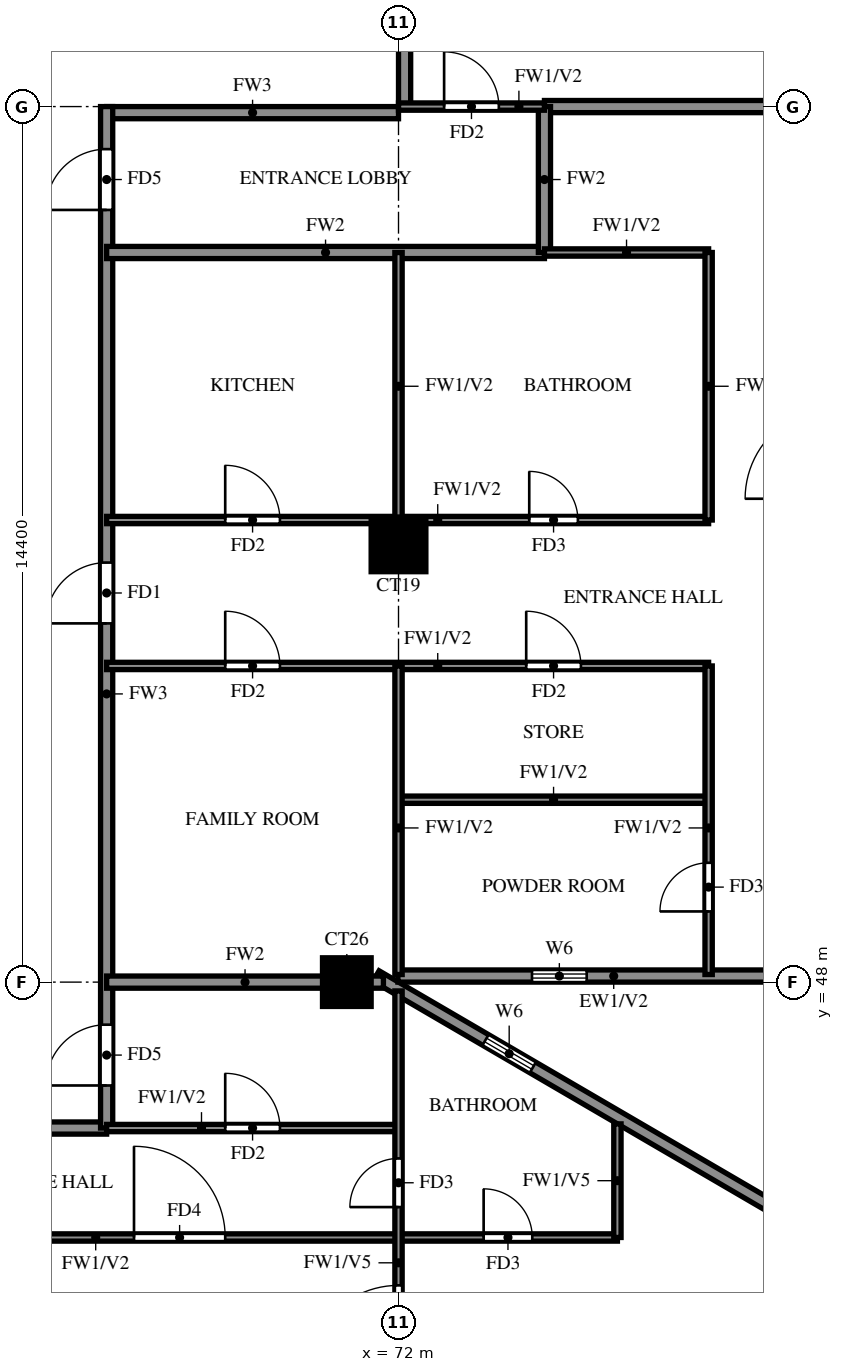
"""IFC4 building model, lengths in metres.
Left out: names, types, materials, properties, quantities, classifications, styles, units other than length and angle.
Written with IfcOpenShell. Run it as: python <this file> out.ifc"""

import sys

from ifc_helpers import new_model, si_unit, direction, frame, frame_2d, origin, origin_2d, place, context, subcontext, project, spatial, rectangle, extrude, source, transform, mapped, element, fill, save


model = new_model("IFC4")
c1 = context("Model", 3, precision=1e-05, world=origin(), true_north=direction((0.0, 1.0)))
c2 = subcontext(c1, "Body", "Model", "MODEL_VIEW")
j1 = project(units=[si_unit("LENGTHUNIT", "METRE"), si_unit("PLANEANGLEUNIT", "RADIAN")], contexts=[c1])
p1 = place(None, origin())
s1 = spatial("IfcSite", under=j1, at=p1, CompositionType="ELEMENT")
p2 = place(p1, origin())
s2 = spatial("IfcBuilding", under=s1, at=p2, CompositionType="ELEMENT")
p3 = place(p2, frame((0.0, 0.0, 192.0)))
s3 = spatial("IfcBuildingStorey", under=s2, at=p3, CompositionType="ELEMENT", Elevation=192.0)
m1 = source(origin(), c2, "Body", "SweptSolid", [
    extrude(rectangle(XDim=0.8, YDim=0.8, at=origin_2d()), origin(), (0.0, 0.0, 1.0), 3.2),
])
p4 = place(p3, frame((71.15, 48.0, 0.0), z_axis=(0.0, 0.0, 1.0), x_axis=(1.0, 0.0, 0.0)))
e1 = element("IfcColumn", 1, at=p4, inside=s3, PredefinedType="COLUMN", context=c2, shape_type="MappedRepresentation", body=[
    mapped(m1, transform((0.0, 0.0, 0.0))),
])
m2 = source(origin(), c2, "Body", "SweptSolid", [
    extrude(rectangle(XDim=0.9, YDim=0.9, at=origin_2d()), origin(), (0.0, 0.0, 1.0), 3.2),
])
p5 = place(p3, frame((72.0, 55.2, 0.0), z_axis=(0.0, 0.0, 1.0), x_axis=(1.0, 0.0, 0.0)))
e2 = element("IfcColumn", 2, at=p5, inside=s3, PredefinedType="COLUMN", context=c2, shape_type="MappedRepresentation", body=[
    mapped(m2, transform((0.0, 0.0, 0.0))),
])
p6 = place(p3, frame((85.719, 39.881, 0.0), z_axis=(0.0, 0.0, 1.0), x_axis=(-0.86377618652, 0.503875678716, 0.0)))
e3 = element("IfcWall", 3, at=p6, inside=s3, PredefinedType="SOLIDWALL", context=c2, shape_type="SweptSolid", body=[
    extrude(rectangle(XDim=16.311, YDim=0.2, at=frame_2d((8.156, 0.0))), origin(), (0.0, 0.0, 1.0), 3.2),
])
p7 = place(p6, frame((13.326, 0.0, 1.5)))
e4 = element("IfcOpeningElement", 4, at=p7, cuts=e3, PredefinedType="OPENING", context=c2, shape_type="SweptSolid", body=[
    extrude(rectangle(XDim=0.9, YDim=0.9, at=frame_2d((0.45, 0.45))), frame((0.0, 0.11, 0.0), z_axis=(0.0, -1.0, 0.0), x_axis=(1.0, 0.0, 0.0)), (0.0, 0.0, 1.0), 0.22),
])
p8 = place(p3, frame((71.99, 48.1, 0.0), z_axis=(0.0, 0.0, 1.0), x_axis=(1.0, 0.0, 0.0)))
e5 = element("IfcWall", 5, at=p8, inside=s3, PredefinedType="SOLIDWALL", context=c2, shape_type="SweptSolid", body=[
    extrude(rectangle(XDim=6.76, YDim=0.2, at=frame_2d((3.38, 0.0))), origin(), (0.0, 0.0, 1.0), 3.2),
])
p9 = place(p8, frame((2.205, 0.0, 1.5)))
e6 = element("IfcOpeningElement", 6, at=p9, cuts=e5, PredefinedType="OPENING", context=c2, shape_type="SweptSolid", body=[
    extrude(rectangle(XDim=0.9, YDim=0.9, at=frame_2d((0.45, 0.45))), frame((0.0, 0.11, 0.0), z_axis=(0.0, -1.0, 0.0), x_axis=(1.0, 0.0, 0.0)), (0.0, 0.0, 1.0), 0.22),
])
p10 = place(p3, frame((60.0, 45.6, 0.0), z_axis=(0.0, 0.0, 1.0), x_axis=(1.0, 0.0, 0.0)))
e7 = element("IfcWall", 7, at=p10, inside=s3, PredefinedType="SOLIDWALL", context=c2, shape_type="SweptSolid", body=[
    extrude(rectangle(XDim=7.2, YDim=0.2, at=frame_2d((3.6, 0.0))), origin(), (0.0, 0.0, 1.0), 3.2),
])
p11 = place(p3, frame((67.2, 62.3, 0.0), z_axis=(0.0, 0.0, 1.0), x_axis=(1.0, 0.0, 0.0)))
e8 = element("IfcWall", 8, at=p11, inside=s3, PredefinedType="SOLIDWALL", context=c2, shape_type="SweptSolid", body=[
    extrude(rectangle(XDim=4.8, YDim=0.2, at=frame_2d((2.4, 0.0))), origin(), (0.0, 0.0, 1.0), 3.2),
])
p12 = place(p3, frame((67.2, 45.6, 0.0), z_axis=(0.0, 0.0, 1.0), x_axis=(0.0, 1.0, 0.0)))
e9 = element("IfcWall", 9, at=p12, inside=s3, PredefinedType="SOLIDWALL", context=c2, shape_type="SweptSolid", body=[
    extrude(rectangle(XDim=16.8, YDim=0.2, at=frame_2d((8.4, 0.0))), origin(), (0.0, 0.0, 1.0), 3.2),
])
p13 = place(p12, frame((8.3, 0.0, 0.0)))
e10 = element("IfcOpeningElement", 10, at=p13, cuts=e9, PredefinedType="OPENING", context=c2, shape_type="SweptSolid", body=[
    extrude(rectangle(XDim=1.0, YDim=2.1, at=frame_2d((0.5, 1.05))), frame((0.0, 0.11, 0.0), z_axis=(0.0, -1.0, 0.0), x_axis=(1.0, 0.0, 0.0)), (0.0, 0.0, 1.0), 0.22),
])
p14 = place(p12, frame((15.1, 0.0, 0.0)))
e11 = element("IfcOpeningElement", 11, at=p14, cuts=e9, PredefinedType="OPENING", context=c2, shape_type="SweptSolid", body=[
    extrude(rectangle(XDim=1.0, YDim=2.1, at=frame_2d((0.5, 1.05))), frame((0.0, 0.11, 0.0), z_axis=(0.0, -1.0, 0.0), x_axis=(1.0, 0.0, 0.0)), (0.0, 0.0, 1.0), 0.22),
])
p15 = place(p12, frame((0.7, 0.0, 0.0)))
e12 = element("IfcOpeningElement", 12, at=p15, cuts=e9, PredefinedType="OPENING", context=c2, shape_type="SweptSolid", body=[
    extrude(rectangle(XDim=1.0, YDim=2.1, at=frame_2d((0.5, 1.05))), frame((0.0, 0.11, 0.0), z_axis=(0.0, -1.0, 0.0), x_axis=(1.0, 0.0, 0.0)), (0.0, 0.0, 1.0), 0.22),
])
p16 = place(p3, frame((72.1, 62.4, 0.0), z_axis=(0.0, 0.0, 1.0), x_axis=(0.0, 1.0, 0.0)))
e13 = element("IfcWall", 13, at=p16, inside=s3, PredefinedType="SOLIDWALL", context=c2, shape_type="SweptSolid", body=[
    extrude(rectangle(XDim=15.6, YDim=0.2, at=frame_2d((7.8, 0.0))), origin(), (0.0, 0.0, 1.0), 3.2),
])
p17 = place(p3, frame((67.2, 48.0, 0.0), z_axis=(0.0, 0.0, 1.0), x_axis=(1.0, 0.0, 0.0)))
e14 = element("IfcWall", 14, at=p17, inside=s3, PredefinedType="SOLIDWALL", context=c2, shape_type="SweptSolid", body=[
    extrude(rectangle(XDim=4.552, YDim=0.2, at=frame_2d((2.276, 0.0))), origin(), (0.0, 0.0, 1.0), 3.2),
])
p18 = place(p3, frame((67.2, 60.0, 0.0), z_axis=(0.0, 0.0, 1.0), x_axis=(1.0, 0.0, 0.0)))
e15 = element("IfcWall", 15, at=p18, inside=s3, PredefinedType="SOLIDWALL", context=c2, shape_type="SweptSolid", body=[
    extrude(rectangle(XDim=7.2, YDim=0.2, at=frame_2d((3.6, 0.0))), origin(), (0.0, 0.0, 1.0), 3.2),
])
p19 = place(p3, frame((74.4, 62.4, 0.0), z_axis=(0.0, 0.0, 1.0), x_axis=(1.0, 0.0, 0.0)))
e16 = element("IfcWall", 16, at=p19, inside=s3, PredefinedType="SOLIDWALL", context=c2, shape_type="SweptSolid", body=[
    extrude(rectangle(XDim=11.875, YDim=0.2, at=frame_2d((5.938, 0.0))), origin(), (0.0, 0.0, 1.0), 3.2),
])
p20 = place(p3, frame((74.4, 60.0, 0.0), z_axis=(0.0, 0.0, 1.0), x_axis=(0.0, 1.0, 0.0)))
e17 = element("IfcWall", 17, at=p20, inside=s3, PredefinedType="SOLIDWALL", context=c2, shape_type="SweptSolid", body=[
    extrude(rectangle(XDim=2.4, YDim=0.2, at=frame_2d((1.2, 0.0))), origin(), (0.0, 0.0, 1.0), 3.2),
])
p21 = place(p3, frame((60.0, 43.8, 0.0), z_axis=(0.0, 0.0, 1.0), x_axis=(1.0, 0.0, 0.0)))
e18 = element("IfcWall", 18, at=p21, inside=s3, PredefinedType="PARTITIONING", context=c2, shape_type="SweptSolid", body=[
    extrude(rectangle(XDim=15.6, YDim=0.12, at=frame_2d((7.8, 0.0))), origin(), (0.0, 0.0, 1.0), 3.2),
])
p22 = place(p21, frame((7.65, 0.0, 0.0)))
e19 = element("IfcOpeningElement", 19, at=p22, cuts=e18, PredefinedType="OPENING", context=c2, shape_type="SweptSolid", body=[
    extrude(rectangle(XDim=1.5, YDim=2.1, at=frame_2d((0.75, 1.05))), frame((0.0, 0.07, 0.0), z_axis=(0.0, -1.0, 0.0), x_axis=(1.0, 0.0, 0.0)), (0.0, 0.0, 1.0), 0.14),
])
p23 = place(p21, frame((1.95, 0.0, 0.0)))
e20 = element("IfcOpeningElement", 20, at=p23, cuts=e18, PredefinedType="OPENING", context=c2, shape_type="SweptSolid", body=[
    extrude(rectangle(XDim=0.9, YDim=2.1, at=frame_2d((0.45, 1.05))), frame((0.0, 0.07, 0.0), z_axis=(0.0, -1.0, 0.0), x_axis=(1.0, 0.0, 0.0)), (0.0, 0.0, 1.0), 0.14),
])
p24 = place(p21, frame((13.4, 0.0, 0.0)))
e21 = element("IfcOpeningElement", 21, at=p24, cuts=e18, PredefinedType="OPENING", context=c2, shape_type="SweptSolid", body=[
    extrude(rectangle(XDim=0.8, YDim=2.1, at=frame_2d((0.4, 1.05))), frame((0.0, 0.07, 0.0), z_axis=(0.0, -1.0, 0.0), x_axis=(1.0, 0.0, 0.0)), (0.0, 0.0, 1.0), 0.14),
])
p25 = place(p3, frame((67.2, 45.6, 0.0), z_axis=(0.0, 0.0, 1.0), x_axis=(1.0, 0.0, 0.0)))
e22 = element("IfcWall", 22, at=p25, inside=s3, PredefinedType="PARTITIONING", context=c2, shape_type="SweptSolid", body=[
    extrude(rectangle(XDim=4.8, YDim=0.12, at=frame_2d((2.4, 0.0))), origin(), (0.0, 0.0, 1.0), 3.2),
])
p26 = place(p25, frame((1.95, 0.0, 0.0)))
e23 = element("IfcOpeningElement", 23, at=p26, cuts=e22, PredefinedType="OPENING", context=c2, shape_type="SweptSolid", body=[
    extrude(rectangle(XDim=0.9, YDim=2.1, at=frame_2d((0.45, 1.05))), frame((0.0, 0.07, 0.0), z_axis=(0.0, -1.0, 0.0), x_axis=(1.0, 0.0, 0.0)), (0.0, 0.0, 1.0), 0.14),
])
p27 = place(p3, frame((72.0, 51.0, 0.0), z_axis=(0.0, 0.0, 1.0), x_axis=(1.0, 0.0, 0.0)))
e24 = element("IfcWall", 24, at=p27, inside=s3, PredefinedType="PARTITIONING", context=c2, shape_type="SweptSolid", body=[
    extrude(rectangle(XDim=5.1, YDim=0.12, at=frame_2d((2.55, 0.0))), origin(), (0.0, 0.0, 1.0), 3.2),
])
p28 = place(p3, frame((67.2, 53.2, 0.0), z_axis=(0.0, 0.0, 1.0), x_axis=(1.0, 0.0, 0.0)))
e25 = element("IfcWall", 25, at=p28, inside=s3, PredefinedType="PARTITIONING", context=c2, shape_type="SweptSolid", body=[
    extrude(rectangle(XDim=9.9, YDim=0.12, at=frame_2d((4.95, 0.0))), origin(), (0.0, 0.0, 1.0), 3.2),
])
p29 = place(p28, frame((6.9, 0.0, 0.0)))
e26 = element("IfcOpeningElement", 26, at=p29, cuts=e25, PredefinedType="OPENING", context=c2, shape_type="SweptSolid", body=[
    extrude(rectangle(XDim=0.9, YDim=2.1, at=frame_2d((0.45, 1.05))), frame((0.0, 0.07, 0.0), z_axis=(0.0, -1.0, 0.0), x_axis=(1.0, 0.0, 0.0)), (0.0, 0.0, 1.0), 0.14),
])
p30 = place(p28, frame((1.95, 0.0, 0.0)))
e27 = element("IfcOpeningElement", 27, at=p30, cuts=e25, PredefinedType="OPENING", context=c2, shape_type="SweptSolid", body=[
    extrude(rectangle(XDim=0.9, YDim=2.1, at=frame_2d((0.45, 1.05))), frame((0.0, 0.07, 0.0), z_axis=(0.0, -1.0, 0.0), x_axis=(1.0, 0.0, 0.0)), (0.0, 0.0, 1.0), 0.14),
])
p31 = place(p3, frame((67.2, 55.6, 0.0), z_axis=(0.0, 0.0, 1.0), x_axis=(1.0, 0.0, 0.0)))
e28 = element("IfcWall", 28, at=p31, inside=s3, PredefinedType="PARTITIONING", context=c2, shape_type="SweptSolid", body=[
    extrude(rectangle(XDim=9.9, YDim=0.12, at=frame_2d((4.95, 0.0))), origin(), (0.0, 0.0, 1.0), 3.2),
])
p32 = place(p31, frame((6.95, 0.0, 0.0)))
e29 = element("IfcOpeningElement", 29, at=p32, cuts=e28, PredefinedType="OPENING", context=c2, shape_type="SweptSolid", body=[
    extrude(rectangle(XDim=0.8, YDim=2.1, at=frame_2d((0.4, 1.05))), frame((0.0, 0.07, 0.0), z_axis=(0.0, -1.0, 0.0), x_axis=(1.0, 0.0, 0.0)), (0.0, 0.0, 1.0), 0.14),
])
p33 = place(p31, frame((1.95, 0.0, 0.0)))
e30 = element("IfcOpeningElement", 30, at=p33, cuts=e28, PredefinedType="OPENING", context=c2, shape_type="SweptSolid", body=[
    extrude(rectangle(XDim=0.9, YDim=2.1, at=frame_2d((0.45, 1.05))), frame((0.0, 0.07, 0.0), z_axis=(0.0, -1.0, 0.0), x_axis=(1.0, 0.0, 0.0)), (0.0, 0.0, 1.0), 0.14),
])
p34 = place(p3, frame((74.4, 60.0, 0.0), z_axis=(0.0, 0.0, 1.0), x_axis=(1.0, 0.0, 0.0)))
e31 = element("IfcWall", 31, at=p34, inside=s3, PredefinedType="PARTITIONING", context=c2, shape_type="SweptSolid", body=[
    extrude(rectangle(XDim=2.7, YDim=0.12, at=frame_2d((1.35, 0.0))), origin(), (0.0, 0.0, 1.0), 3.2),
])
p35 = place(p3, frame((72.0, 62.4, 0.0), z_axis=(0.0, 0.0, 1.0), x_axis=(1.0, 0.0, 0.0)))
e32 = element("IfcWall", 32, at=p35, inside=s3, PredefinedType="PARTITIONING", context=c2, shape_type="SweptSolid", body=[
    extrude(rectangle(XDim=2.4, YDim=0.12, at=frame_2d((1.2, 0.0))), origin(), (0.0, 0.0, 1.0), 3.2),
])
p36 = place(p35, frame((0.75, 0.0, 0.0)))
e33 = element("IfcOpeningElement", 33, at=p36, cuts=e32, PredefinedType="OPENING", context=c2, shape_type="SweptSolid", body=[
    extrude(rectangle(XDim=0.9, YDim=2.1, at=frame_2d((0.45, 1.05))), frame((0.0, 0.07, 0.0), z_axis=(0.0, -1.0, 0.0), x_axis=(1.0, 0.0, 0.0)), (0.0, 0.0, 1.0), 0.14),
])
p37 = place(p3, frame((72.0, 39.725, 0.0), z_axis=(0.0, 0.0, 1.0), x_axis=(0.0, 1.0, 0.0)))
e34 = element("IfcWall", 34, at=p37, inside=s3, PredefinedType="PARTITIONING", context=c2, shape_type="SweptSolid", body=[
    extrude(rectangle(XDim=8.13, YDim=0.12, at=frame_2d((4.065, 0.0))), origin(), (0.0, 0.0, 1.0), 2.3),
])
p38 = place(p37, frame((1.788, 0.0, 0.0)))
e35 = element("IfcOpeningElement", 35, at=p38, cuts=e34, PredefinedType="OPENING", context=c2, shape_type="SweptSolid", body=[
    extrude(rectangle(XDim=1.5, YDim=2.1, at=frame_2d((0.75, 1.05))), frame((0.0, 0.07, 0.0), z_axis=(0.0, -1.0, 0.0), x_axis=(1.0, 0.0, 0.0)), (0.0, 0.0, 1.0), 0.14),
])
p39 = place(p37, frame((4.575, 0.0, 0.0)))
e36 = element("IfcOpeningElement", 36, at=p39, cuts=e34, PredefinedType="OPENING", context=c2, shape_type="SweptSolid", body=[
    extrude(rectangle(XDim=0.8, YDim=2.1, at=frame_2d((0.4, 1.05))), frame((0.0, 0.07, 0.0), z_axis=(0.0, -1.0, 0.0), x_axis=(1.0, 0.0, 0.0)), (0.0, 0.0, 1.0), 0.14),
])
p40 = place(p3, frame((72.0, 48.125, 0.0), z_axis=(0.0, 0.0, 1.0), x_axis=(0.0, 1.0, 0.0)))
e37 = element("IfcWall", 37, at=p40, inside=s3, PredefinedType="PARTITIONING", context=c2, shape_type="SweptSolid", body=[
    extrude(rectangle(XDim=5.075, YDim=0.12, at=frame_2d((2.538, 0.0))), origin(), (0.0, 0.0, 1.0), 3.2),
])
p41 = place(p3, frame((72.0, 55.6, 0.0), z_axis=(0.0, 0.0, 1.0), x_axis=(0.0, 1.0, 0.0)))
e38 = element("IfcWall", 38, at=p41, inside=s3, PredefinedType="PARTITIONING", context=c2, shape_type="SweptSolid", body=[
    extrude(rectangle(XDim=4.4, YDim=0.12, at=frame_2d((2.2, 0.0))), origin(), (0.0, 0.0, 1.0), 3.2),
])
p42 = place(p3, frame((75.6, 43.8, 0.0), z_axis=(0.0, 0.0, 1.0), x_axis=(0.0, 1.0, 0.0)))
e39 = element("IfcWall", 39, at=p42, inside=s3, PredefinedType="PARTITIONING", context=c2, shape_type="SweptSolid", body=[
    extrude(rectangle(XDim=1.868, YDim=0.12, at=frame_2d((0.934, 0.0))), origin(), (0.0, 0.0, 1.0), 2.3),
])
p43 = place(p3, frame((77.1, 48.125, 0.0), z_axis=(0.0, 0.0, 1.0), x_axis=(0.0, 1.0, 0.0)))
e40 = element("IfcWall", 40, at=p43, inside=s3, PredefinedType="PARTITIONING", context=c2, shape_type="SweptSolid", body=[
    extrude(rectangle(XDim=5.075, YDim=0.12, at=frame_2d((2.538, 0.0))), origin(), (0.0, 0.0, 1.0), 3.2),
])
p44 = place(p43, frame((1.038, 0.0, 0.0)))
e41 = element("IfcOpeningElement", 41, at=p44, cuts=e40, PredefinedType="OPENING", context=c2, shape_type="SweptSolid", body=[
    extrude(rectangle(XDim=0.8, YDim=2.1, at=frame_2d((0.4, 1.05))), frame((0.0, 0.07, 0.0), z_axis=(0.0, -1.0, 0.0), x_axis=(1.0, 0.0, 0.0)), (0.0, 0.0, 1.0), 0.14),
])
p45 = place(p3, frame((77.1, 55.6, 0.0), z_axis=(0.0, 0.0, 1.0), x_axis=(0.0, 1.0, 0.0)))
e42 = element("IfcWall", 42, at=p45, inside=s3, PredefinedType="PARTITIONING", context=c2, shape_type="SweptSolid", body=[
    extrude(rectangle(XDim=4.4, YDim=0.12, at=frame_2d((2.2, 0.0))), origin(), (0.0, 0.0, 1.0), 3.2),
])
p46 = place(p7, origin())
e43 = element("IfcWindow", 43, at=p46, inside=s3, PartitioningType="SINGLE_PANEL", PredefinedType="WINDOW", context=c2, shape_type="SweptSolid", body=[
    extrude(rectangle(XDim=0.9, YDim=0.9, at=frame_2d((0.45, 0.45))), frame((0.0, 0.03, 0.0), z_axis=(0.0, -1.0, 0.0), x_axis=(1.0, 0.0, 0.0)), (0.0, 0.0, 1.0), 0.06),
])
fill(e4, e43)
p47 = place(p9, origin())
e44 = element("IfcWindow", 44, at=p47, inside=s3, PartitioningType="SINGLE_PANEL", PredefinedType="WINDOW", context=c2, shape_type="SweptSolid", body=[
    extrude(rectangle(XDim=0.9, YDim=0.9, at=frame_2d((0.45, 0.45))), frame((0.0, 0.03, 0.0), z_axis=(0.0, -1.0, 0.0), x_axis=(1.0, 0.0, 0.0)), (0.0, 0.0, 1.0), 0.06),
])
fill(e6, e44)
p48 = place(p13, origin())
e45 = element("IfcDoor", 45, at=p48, inside=s3, OperationType="SINGLE_SWING_LEFT", PredefinedType="DOOR", context=c2, shape_type="SweptSolid", body=[
    extrude(rectangle(XDim=1.0, YDim=2.1, at=frame_2d((0.5, 1.05))), frame((0.0, 0.025, 0.0), z_axis=(0.0, -1.0, 0.0), x_axis=(1.0, 0.0, 0.0)), (0.0, 0.0, 1.0), 0.05),
])
fill(e10, e45)
p49 = place(p44, origin())
e46 = element("IfcDoor", 46, at=p49, inside=s3, OperationType="SINGLE_SWING_RIGHT", PredefinedType="DOOR", context=c2, shape_type="SweptSolid", body=[
    extrude(rectangle(XDim=0.8, YDim=2.1, at=frame_2d((0.4, 1.05))), frame((0.0, 0.025, 0.0), z_axis=(0.0, -1.0, 0.0), x_axis=(1.0, 0.0, 0.0)), (0.0, 0.0, 1.0), 0.05),
])
fill(e41, e46)
p50 = place(p29, origin())
e47 = element("IfcDoor", 47, at=p50, inside=s3, OperationType="SINGLE_SWING_LEFT", PredefinedType="DOOR", context=c2, shape_type="SweptSolid", body=[
    extrude(rectangle(XDim=0.9, YDim=2.1, at=frame_2d((0.45, 1.05))), frame((0.0, 0.025, 0.0), z_axis=(0.0, -1.0, 0.0), x_axis=(1.0, 0.0, 0.0)), (0.0, 0.0, 1.0), 0.05),
])
fill(e26, e47)
p51 = place(p32, origin())
e48 = element("IfcDoor", 48, at=p51, inside=s3, OperationType="SINGLE_SWING_LEFT", PredefinedType="DOOR", context=c2, shape_type="SweptSolid", body=[
    extrude(rectangle(XDim=0.8, YDim=2.1, at=frame_2d((0.4, 1.05))), frame((0.0, 0.025, 0.0), z_axis=(0.0, -1.0, 0.0), x_axis=(1.0, 0.0, 0.0)), (0.0, 0.0, 1.0), 0.05),
])
fill(e29, e48)
p52 = place(p30, origin())
e49 = element("IfcDoor", 49, at=p52, inside=s3, OperationType="SINGLE_SWING_RIGHT", PredefinedType="DOOR", context=c2, shape_type="SweptSolid", body=[
    extrude(rectangle(XDim=0.9, YDim=2.1, at=frame_2d((0.45, 1.05))), frame((0.0, 0.025, 0.0), z_axis=(0.0, -1.0, 0.0), x_axis=(1.0, 0.0, 0.0)), (0.0, 0.0, 1.0), 0.05),
])
fill(e27, e49)
p53 = place(p33, origin())
e50 = element("IfcDoor", 50, at=p53, inside=s3, OperationType="SINGLE_SWING_LEFT", PredefinedType="DOOR", context=c2, shape_type="SweptSolid", body=[
    extrude(rectangle(XDim=0.9, YDim=2.1, at=frame_2d((0.45, 1.05))), frame((0.0, 0.025, 0.0), z_axis=(0.0, -1.0, 0.0), x_axis=(1.0, 0.0, 0.0)), (0.0, 0.0, 1.0), 0.05),
])
fill(e30, e50)
p54 = place(p36, origin())
e51 = element("IfcDoor", 51, at=p54, inside=s3, OperationType="SINGLE_SWING_RIGHT", PredefinedType="DOOR", context=c2, shape_type="SweptSolid", body=[
    extrude(rectangle(XDim=0.9, YDim=2.1, at=frame_2d((0.45, 1.05))), frame((0.0, 0.025, 0.0), z_axis=(0.0, -1.0, 0.0), x_axis=(1.0, 0.0, 0.0)), (0.0, 0.0, 1.0), 0.05),
])
fill(e33, e51)
p55 = place(p14, origin())
e52 = element("IfcDoor", 52, at=p55, inside=s3, OperationType="SINGLE_SWING_LEFT", PredefinedType="DOOR", context=c2, shape_type="SweptSolid", body=[
    extrude(rectangle(XDim=1.0, YDim=2.1, at=frame_2d((0.5, 1.05))), frame((0.0, 0.025, 0.0), z_axis=(0.0, -1.0, 0.0), x_axis=(1.0, 0.0, 0.0)), (0.0, 0.0, 1.0), 0.05),
])
fill(e11, e52)
p56 = place(p26, origin())
e53 = element("IfcDoor", 53, at=p56, inside=s3, OperationType="SINGLE_SWING_RIGHT", PredefinedType="DOOR", context=c2, shape_type="SweptSolid", body=[
    extrude(rectangle(XDim=0.9, YDim=2.1, at=frame_2d((0.45, 1.05))), frame((0.0, 0.025, 0.0), z_axis=(0.0, -1.0, 0.0), x_axis=(1.0, 0.0, 0.0)), (0.0, 0.0, 1.0), 0.05),
])
fill(e23, e53)
p57 = place(p15, origin())
e54 = element("IfcDoor", 54, at=p57, inside=s3, OperationType="SINGLE_SWING_LEFT", PredefinedType="DOOR", context=c2, shape_type="SweptSolid", body=[
    extrude(rectangle(XDim=1.0, YDim=2.1, at=frame_2d((0.5, 1.05))), frame((0.0, 0.025, 0.0), z_axis=(0.0, -1.0, 0.0), x_axis=(1.0, 0.0, 0.0)), (0.0, 0.0, 1.0), 0.05),
])
fill(e12, e54)
p58 = place(p22, origin())
e55 = element("IfcDoor", 55, at=p58, inside=s3, OperationType="SINGLE_SWING_LEFT", PredefinedType="DOOR", context=c2, shape_type="SweptSolid", body=[
    extrude(rectangle(XDim=1.5, YDim=2.1, at=frame_2d((0.75, 1.05))), frame((0.0, 0.025, 0.0), z_axis=(0.0, -1.0, 0.0), x_axis=(1.0, 0.0, 0.0)), (0.0, 0.0, 1.0), 0.05),
])
fill(e19, e55)
p59 = place(p38, origin())
e56 = element("IfcDoor", 56, at=p59, inside=s3, OperationType="SINGLE_SWING_RIGHT", PredefinedType="DOOR", context=c2, shape_type="SweptSolid", body=[
    extrude(rectangle(XDim=1.5, YDim=2.1, at=frame_2d((0.75, 1.05))), frame((0.0, 0.025, 0.0), z_axis=(0.0, -1.0, 0.0), x_axis=(1.0, 0.0, 0.0)), (0.0, 0.0, 1.0), 0.05),
])
fill(e35, e56)
p60 = place(p39, origin())
e57 = element("IfcDoor", 57, at=p60, inside=s3, OperationType="SINGLE_SWING_LEFT", PredefinedType="DOOR", context=c2, shape_type="SweptSolid", body=[
    extrude(rectangle(XDim=0.8, YDim=2.1, at=frame_2d((0.4, 1.05))), frame((0.0, 0.025, 0.0), z_axis=(0.0, -1.0, 0.0), x_axis=(1.0, 0.0, 0.0)), (0.0, 0.0, 1.0), 0.05),
])
fill(e36, e57)
p61 = place(p24, origin())
e58 = element("IfcDoor", 58, at=p61, inside=s3, OperationType="SINGLE_SWING_RIGHT", PredefinedType="DOOR", context=c2, shape_type="SweptSolid", body=[
    extrude(rectangle(XDim=0.8, YDim=2.1, at=frame_2d((0.4, 1.05))), frame((0.0, 0.025, 0.0), z_axis=(0.0, -1.0, 0.0), x_axis=(1.0, 0.0, 0.0)), (0.0, 0.0, 1.0), 0.05),
])
fill(e21, e58)
save(model, sys.argv[1])
